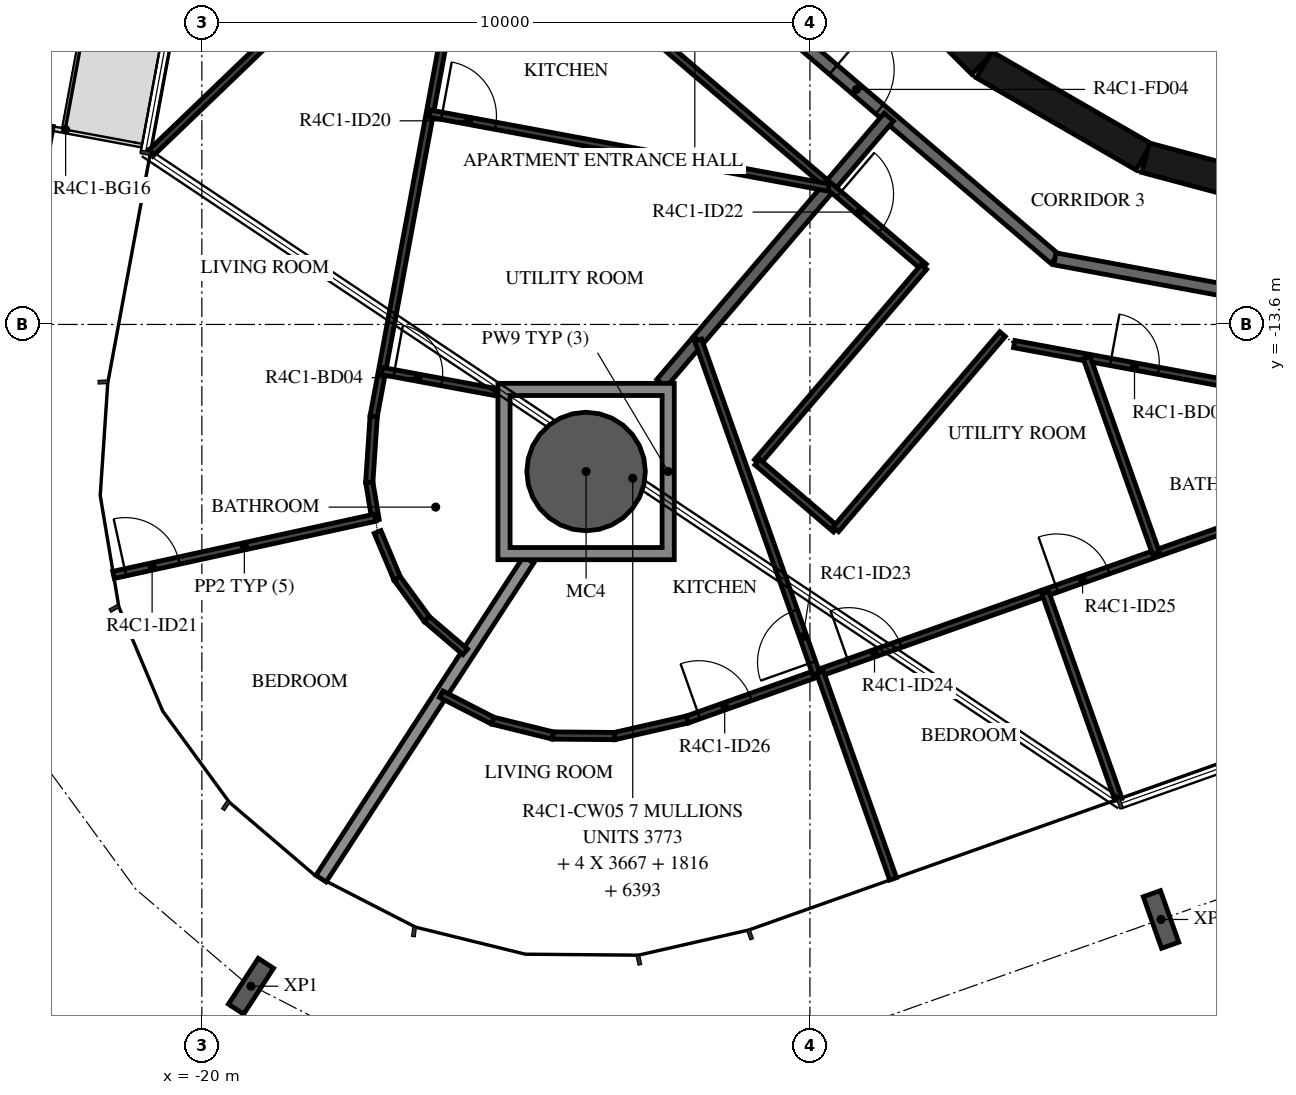
"""IFC4 building model, lengths in metres.
Left out: names, types, materials, properties, quantities, classifications, styles, units other than length and angle.
Written with IfcOpenShell. Run it as: python <this file> out.ifc"""

import sys

from ifc_helpers import new_model, si_unit, direction, frame, frame_2d, origin, origin_2d, place, context, subcontext, project, spatial, polyline, rectangle, hollow_circle, i_section, outline, extrude, element, fill, save


model = new_model("IFC4")
c1 = context("Model", 3, precision=1e-05, world=origin(), true_north=direction((0.0, 1.0)))
c2 = subcontext(c1, "Body", "Model", "MODEL_VIEW")
j1 = project(units=[si_unit("LENGTHUNIT", "METRE"), si_unit("PLANEANGLEUNIT", "RADIAN")], contexts=[c1])
p1 = place(None, origin())
s1 = spatial("IfcSite", under=j1, at=p1, CompositionType="ELEMENT")
p2 = place(p1, origin())
s2 = spatial("IfcBuilding", under=s1, at=p2, CompositionType="ELEMENT")
p3 = place(p2, frame((0.0, 0.0, 176.2)))
s3 = spatial("IfcBuildingStorey", under=s2, at=p3, CompositionType="ELEMENT", Elevation=176.2)
p4 = place(p3, frame((-13.681, -16.019, -0.38), z_axis=(0.0, 0.0, 1.0), x_axis=(1.0, 0.0, 0.0)))
e1 = element("IfcColumn", 1, at=p4, inside=s3, PredefinedType="COLUMN", context=c2, shape_type="SweptSolid", body=[
    extrude(hollow_circle(Radius=0.975, WallThickness=0.045, at=origin_2d()), origin(), (0.0, 0.0, 1.0), 3.5),
])
for number, where, z_axis, x_axis in (
    (2, (-22.914, -10.409, -0.38), (0.0, 0.0, 1.0), (0.182, 0.983, 0.0)),
    (3, (-19.192, -24.483, -0.38), (0.0, 0.0, 1.0), (-0.838, 0.546, 0.0)),
    (4, (-4.226, -23.385, -0.38), (0.0, 0.0, 1.0), (-0.943, -0.334, 0.0)),
):
    element("IfcColumn", number, at=place(p3, frame(where, z_axis=z_axis, x_axis=x_axis)), inside=s3, PredefinedType="COLUMN", context=c2, shape_type="SweptSolid", body=[
        extrude(i_section(OverallWidth=0.3, OverallDepth=0.9, WebThickness=0.019, FlangeThickness=0.035, FilletRadius=0.03, at=origin_2d()), origin(), (0.0, 0.0, 1.0), 3.5),
    ])
p5 = place(p3, frame((-9.308, -7.164, 0.0), z_axis=(0.0, 0.0, 1.0), x_axis=(0.707106781187, -0.707106781187, 0.0)))
e5 = element("IfcWall", 5, at=p5, inside=s3, PredefinedType="SHEAR", context=c2, shape_type="SweptSolid", body=[
    extrude(rectangle(XDim=3.032, YDim=0.5, at=frame_2d((1.516, 0.0))), origin(), (0.0, 0.0, 1.0), 3.12),
])
for number, where, z_axis, x_axis in (
    (6, (-7.137, -9.329, 0.0), (0.0, 0.0, 1.0), (0.866, -0.5, 0.0)),
    (7, (-4.479, -10.858, 0.0), (0.0, 0.0, 1.0), (0.966, -0.259, 0.0)),
):
    element("IfcWall", number, at=place(p3, frame(where, z_axis=z_axis, x_axis=x_axis)), inside=s3, PredefinedType="SHEAR", context=c2, shape_type="SweptSolid", body=[
        extrude(rectangle(XDim=3.033, YDim=0.5, at=frame_2d((1.516, 0.0))), origin(), (0.0, 0.0, 1.0), 3.12),
    ])
p6 = place(p3, frame((-11.433, -7.858, 0.0), z_axis=(0.0, 0.0, 1.0), x_axis=(0.760412154545, -0.649440801937, 0.0)))
e8 = element("IfcWall", 8, at=p6, inside=s3, PredefinedType="STANDARD", context=c2, shape_type="SweptSolid", body=[
    extrude(rectangle(XDim=7.181, YDim=0.2, at=frame_2d((3.59, 0.0))), origin(), (0.0, 0.0, 1.0), 3.12),
])
p7 = place(p6, frame((2.39, 0.0, 0.0)))
e9 = element("IfcOpeningElement", 9, at=p7, cuts=e8, PredefinedType="OPENING", context=c2, shape_type="SweptSolid", body=[
    extrude(rectangle(XDim=1.0, YDim=2.1, at=frame_2d((0.5, 1.05))), frame((0.0, 0.11, 0.0), z_axis=(0.0, -1.0, 0.0), x_axis=(1.0, 0.0, 0.0)), (0.0, 0.0, 1.0), 0.22),
])
p8 = place(p3, frame((-5.972, -12.521, 0.0), z_axis=(0.0, 0.0, 1.0), x_axis=(0.983256068163, -0.18222926335, 0.0)))
e10 = element("IfcWall", 10, at=p8, inside=s3, PredefinedType="STANDARD", context=c2, shape_type="SweptSolid", body=[
    extrude(rectangle(XDim=7.181, YDim=0.2, at=frame_2d((3.59, 0.0))), origin(), (0.0, 0.0, 1.0), 3.12),
])
p9 = place(p8, frame((4.7, 0.0, 0.0)))
e11 = element("IfcOpeningElement", 11, at=p9, cuts=e10, PredefinedType="OPENING", context=c2, shape_type="SweptSolid", body=[
    extrude(rectangle(XDim=1.0, YDim=2.1, at=frame_2d((0.5, 1.05))), frame((0.0, 0.11, 0.0), z_axis=(0.0, -1.0, 0.0), x_axis=(1.0, 0.0, 0.0)), (0.0, 0.0, 1.0), 0.22),
])
p10 = place(p3, frame((-11.838, -13.86, 0.0), z_axis=(0.0, 0.0, 1.0), x_axis=(0.64944503311, 0.760408540831, 0.0)))
e12 = element("IfcWall", 12, at=p10, inside=s3, PredefinedType="STANDARD", context=c2, shape_type="SweptSolid", body=[
    extrude(rectangle(XDim=4.827, YDim=0.2, at=frame_2d((2.414, 0.0))), origin(), (0.0, 0.0, 1.0), 3.12),
])
p11 = place(p3, frame((-12.443, -14.569, 0.0), z_axis=(0.0, 0.0, 1.0), x_axis=(0.649517408851, 0.760346720648, 0.0)))
e13 = element("IfcWall", 13, at=p11, inside=s3, PredefinedType="STANDARD", context=c2, shape_type="SweptSolid", body=[
    extrude(rectangle(XDim=0.932, YDim=0.2, at=frame_2d((0.466, 0.0))), origin(), (0.0, 0.0, 1.0), 3.12),
])
p12 = place(p3, frame((-18.04, -22.713, 0.0), z_axis=(0.0, 0.0, 1.0), x_axis=(0.545628572271, 0.838027124335, 0.0)))
e14 = element("IfcWall", 14, at=p12, inside=s3, PredefinedType="STANDARD", context=c2, shape_type="SweptSolid", body=[
    extrude(rectangle(XDim=6.258, YDim=0.2, at=frame_2d((3.129, 0.0))), origin(), (0.0, 0.0, 1.0), 2.73),
])
p13 = place(p3, frame((-12.713, -8.737, 0.0), z_axis=(0.0, 0.0, 1.0), x_axis=(0.760432387723, -0.649417110725, 0.0)))
e15 = element("IfcWall", 15, at=p13, inside=s3, PredefinedType="PARTITIONING", context=c2, shape_type="SweptSolid", body=[
    extrude(rectangle(XDim=6.032, YDim=0.12, at=frame_2d((3.016, 0.0))), origin(), (0.0, 0.0, 1.0), 3.12),
])
p14 = place(p13, frame((4.192, 0.0, 0.0)))
e16 = element("IfcOpeningElement", 16, at=p14, cuts=e15, PredefinedType="OPENING", context=c2, shape_type="SweptSolid", body=[
    extrude(rectangle(XDim=0.9, YDim=2.1, at=frame_2d((0.45, 1.05))), frame((0.0, 0.07, 0.0), z_axis=(0.0, -1.0, 0.0), x_axis=(1.0, 0.0, 0.0)), (0.0, 0.0, 1.0), 0.14),
])
p15 = place(p3, frame((-20.849, -10.792, 0.0), z_axis=(0.0, 0.0, 1.0), x_axis=(0.721364983662, 0.692555095531, 0.0)))
e17 = element("IfcWall", 17, at=p15, inside=s3, PredefinedType="PARTITIONING", context=c2, shape_type="SweptSolid", body=[
    extrude(rectangle(XDim=6.771, YDim=0.12, at=frame_2d((3.385, 0.0))), origin(), (0.0, 0.0, 1.0), 3.12),
])
p16 = place(p3, frame((-15.51, -6.13, 0.0), z_axis=(0.0, 0.0, 1.0), x_axis=(-0.182243361628, -0.98325345519, 0.0)))
e18 = element("IfcWall", 18, at=p16, inside=s3, PredefinedType="PARTITIONING", context=c2, shape_type="SweptSolid", body=[
    extrude(rectangle(XDim=9.134, YDim=0.12, at=frame_2d((4.567, 0.0))), origin(), (0.0, 0.0, 1.0), 3.12),
])
p17 = place(p16, frame((0.6, 0.0, 0.0)))
e19 = element("IfcOpeningElement", 19, at=p17, cuts=e18, PredefinedType="OPENING", context=c2, shape_type="SweptSolid", body=[
    extrude(rectangle(XDim=0.9, YDim=2.1, at=frame_2d((0.45, 1.05))), frame((0.0, 0.07, 0.0), z_axis=(0.0, -1.0, 0.0), x_axis=(1.0, 0.0, 0.0)), (0.0, 0.0, 1.0), 0.14),
])
p18 = place(p3, frame((-16.252, -10.133, 0.0), z_axis=(0.0, 0.0, 1.0), x_axis=(0.983256998026, -0.182224246005, 0.0)))
e20 = element("IfcWall", 20, at=p18, inside=s3, PredefinedType="PARTITIONING", context=c2, shape_type="SweptSolid", body=[
    extrude(rectangle(XDim=6.671, YDim=0.12, at=frame_2d((3.335, 0.0))), origin(), (0.0, 0.0, 1.0), 3.12),
])
p19 = place(p18, frame((0.2, 0.0, 0.0)))
e21 = element("IfcOpeningElement", 21, at=p19, cuts=e20, PredefinedType="OPENING", context=c2, shape_type="SweptSolid", body=[
    extrude(rectangle(XDim=0.9, YDim=2.1, at=frame_2d((0.45, 1.05))), frame((0.0, 0.07, 0.0), z_axis=(0.0, -1.0, 0.0), x_axis=(1.0, 0.0, 0.0)), (0.0, 0.0, 1.0), 0.14),
])
p20 = place(p3, frame((-17.143, -16.817, 0.0), z_axis=(0.0, 0.0, 1.0), x_axis=(-0.164964120994, 0.98629956848, 0.0)))
e22 = element("IfcWall", 22, at=p20, inside=s3, PredefinedType="PARTITIONING", context=c2, shape_type="SweptSolid", body=[
    extrude(rectangle(XDim=0.63, YDim=0.12, at=frame_2d((0.315, 0.0))), origin(), (0.0, 0.0, 1.0), 3.12),
])
p21 = place(p3, frame((-17.247, -16.195, 0.0), z_axis=(0.0, 0.0, 1.0), x_axis=(0.066712820538, 0.997772218282, 0.0)))
e23 = element("IfcWall", 23, at=p21, inside=s3, PredefinedType="PARTITIONING", context=c2, shape_type="SweptSolid", body=[
    extrude(rectangle(XDim=1.087, YDim=0.12, at=frame_2d((0.543, 0.0))), origin(), (0.0, 0.0, 1.0), 3.12),
])
p22 = place(p3, frame((-21.453, -17.719, 0.0), z_axis=(0.0, 0.0, 1.0), x_axis=(0.976887361549, 0.213754725903, 0.0)))
e24 = element("IfcWall", 24, at=p22, inside=s3, PredefinedType="PARTITIONING", context=c2, shape_type="SweptSolid", body=[
    extrude(rectangle(XDim=4.405, YDim=0.12, at=frame_2d((2.203, 0.0))), origin(), (0.0, 0.0, 1.0), 2.73),
])
p23 = place(p22, frame((0.2, 0.0, 0.0)))
e25 = element("IfcOpeningElement", 25, at=p23, cuts=e24, PredefinedType="OPENING", context=c2, shape_type="SweptSolid", body=[
    extrude(rectangle(XDim=0.9, YDim=2.1, at=frame_2d((0.45, 1.05))), frame((0.0, 0.07, 0.0), z_axis=(0.0, -1.0, 0.0), x_axis=(1.0, 0.0, 0.0)), (0.0, 0.0, 1.0), 0.14),
])
p24 = place(p3, frame((-17.036, -14.366, 0.0), z_axis=(0.0, 0.0, 1.0), x_axis=(0.983259435886, -0.182211091156, 0.0)))
e26 = element("IfcWall", 26, at=p24, inside=s3, PredefinedType="PARTITIONING", context=c2, shape_type="SweptSolid", body=[
    extrude(rectangle(XDim=1.938, YDim=0.12, at=frame_2d((0.969, 0.0))), origin(), (0.0, 0.0, 1.0), 3.12),
])
p25 = place(p24, frame((0.2, 0.0, 0.0)))
e27 = element("IfcOpeningElement", 27, at=p25, cuts=e26, PredefinedType="OPENING", context=c2, shape_type="SweptSolid", body=[
    extrude(rectangle(XDim=0.8, YDim=2.1, at=frame_2d((0.4, 1.05))), frame((0.0, 0.07, 0.0), z_axis=(0.0, -1.0, 0.0), x_axis=(1.0, 0.0, 0.0)), (0.0, 0.0, 1.0), 0.14),
])
for number, where, z_axis, x_axis in (
    (28, (-17.11, -17.013, 0.0), (0.0, 0.0, 1.0), (0.388, -0.922, 0.0)),
    (29, (-16.788, -17.777, 0.0), (0.0, 0.0, 1.0), (0.59, -0.807, 0.0)),
    (30, (-16.299, -18.446, 0.0), (0.0, 0.0, 1.0), (0.76, -0.649, 0.0)),
):
    element("IfcWall", number, at=place(p3, frame(where, z_axis=z_axis, x_axis=x_axis)), inside=s3, PredefinedType="PARTITIONING", context=c2, shape_type="SweptSolid", body=[
        extrude(rectangle(XDim=0.829, YDim=0.12, at=frame_2d((0.415, 0.0))), origin(), (0.0, 0.0, 1.0), 3.12),
    ])
p26 = place(p3, frame((-8.125, -12.655, 0.0), z_axis=(0.0, 0.0, 1.0), x_axis=(-0.649441944702, -0.760411178549, 0.0)))
e31 = element("IfcWall", 31, at=p26, inside=s3, PredefinedType="PARTITIONING", context=c2, shape_type="SweptSolid", body=[
    extrude(rectangle(XDim=4.22, YDim=0.12, at=frame_2d((2.11, 0.0))), origin(), (0.0, 0.0, 1.0), 3.12),
])
p27 = place(p3, frame((-10.866, -15.864, 0.0), z_axis=(0.0, 0.0, 1.0), x_axis=(0.760431300628, -0.649418383652, 0.0)))
e32 = element("IfcWall", 32, at=p27, inside=s3, PredefinedType="PARTITIONING", context=c2, shape_type="SweptSolid", body=[
    extrude(rectangle(XDim=1.7, YDim=0.12, at=frame_2d((0.85, 0.0))), origin(), (0.0, 0.0, 1.0), 3.12),
])
p28 = place(p3, frame((-9.573, -16.968, 0.0), z_axis=(0.0, 0.0, 1.0), x_axis=(0.649437062208, 0.760415348498, 0.0)))
e33 = element("IfcWall", 33, at=p28, inside=s3, PredefinedType="PARTITIONING", context=c2, shape_type="SweptSolid", body=[
    extrude(rectangle(XDim=4.219, YDim=0.12, at=frame_2d((2.11, 0.0))), origin(), (0.0, 0.0, 1.0), 3.12),
])
p29 = place(p3, frame((-6.641, -13.923, 0.0), z_axis=(0.0, 0.0, 1.0), x_axis=(0.983250157272, -0.182261153912, 0.0)))
e34 = element("IfcWall", 34, at=p29, inside=s3, PredefinedType="PARTITIONING", context=c2, shape_type="SweptSolid", body=[
    extrude(rectangle(XDim=7.985, YDim=0.12, at=frame_2d((3.992, 0.0))), origin(), (0.0, 0.0, 1.0), 3.12),
])
p30 = place(p29, frame((1.612, 0.0, 0.0)))
e35 = element("IfcOpeningElement", 35, at=p30, cuts=e34, PredefinedType="OPENING", context=c2, shape_type="SweptSolid", body=[
    extrude(rectangle(XDim=0.8, YDim=2.1, at=frame_2d((0.4, 1.05))), frame((0.0, 0.07, 0.0), z_axis=(0.0, -1.0, 0.0), x_axis=(1.0, 0.0, 0.0)), (0.0, 0.0, 1.0), 0.14),
])
p31 = place(p3, frame((-16.065, -19.68, 0.0), z_axis=(0.0, 0.0, 1.0), x_axis=(0.889684645268, -0.456575549033, 0.0)))
e36 = element("IfcWall", 36, at=p31, inside=s3, PredefinedType="PARTITIONING", context=c2, shape_type="SweptSolid", body=[
    extrude(rectangle(XDim=0.957, YDim=0.12, at=frame_2d((0.479, 0.0))), origin(), (0.0, 0.0, 1.0), 3.12),
])
p32 = place(p3, frame((-15.214, -20.117, 0.0), z_axis=(0.0, 0.0, 1.0), x_axis=(0.970998575146, -0.239085271534, 0.0)))
e37 = element("IfcWall", 37, at=p32, inside=s3, PredefinedType="PARTITIONING", context=c2, shape_type="SweptSolid", body=[
    extrude(rectangle(XDim=1.016, YDim=0.12, at=frame_2d((0.508, 0.0))), origin(), (0.0, 0.0, 1.0), 3.12),
])
p33 = place(p3, frame((-14.227, -20.36, 0.0), z_axis=(0.0, 0.0, 1.0), x_axis=(0.999960467683, -0.008891741722, 0.0)))
e38 = element("IfcWall", 38, at=p33, inside=s3, PredefinedType="PARTITIONING", context=c2, shape_type="SweptSolid", body=[
    extrude(rectangle(XDim=1.016, YDim=0.12, at=frame_2d((0.508, 0.0))), origin(), (0.0, 0.0, 1.0), 3.12),
])
p34 = place(p3, frame((-13.211, -20.369, 0.0), z_axis=(0.0, 0.0, 1.0), x_axis=(0.974997834831, 0.222214360642, 0.0)))
e39 = element("IfcWall", 39, at=p34, inside=s3, PredefinedType="PARTITIONING", context=c2, shape_type="SweptSolid", body=[
    extrude(rectangle(XDim=1.227, YDim=0.12, at=frame_2d((0.614, 0.0))), origin(), (0.0, 0.0, 1.0), 3.12),
])
p35 = place(p3, frame((-12.015, -20.096, 0.0), z_axis=(0.0, 0.0, 1.0), x_axis=(0.942638913957, 0.33381413675, 0.0)))
e40 = element("IfcWall", 40, at=p35, inside=s3, PredefinedType="PARTITIONING", context=c2, shape_type="SweptSolid", body=[
    extrude(rectangle(XDim=14.104, YDim=0.12, at=frame_2d((7.052, 0.0))), origin(), (0.0, 0.0, 1.0), 3.12),
])
p36 = place(p35, frame((2.814, 0.0, 0.0)))
e41 = element("IfcOpeningElement", 41, at=p36, cuts=e40, PredefinedType="OPENING", context=c2, shape_type="SweptSolid", body=[
    extrude(rectangle(XDim=0.9, YDim=2.1, at=frame_2d((0.45, 1.05))), frame((0.0, 0.07, 0.0), z_axis=(0.0, -1.0, 0.0), x_axis=(1.0, 0.0, 0.0)), (0.0, 0.0, 1.0), 0.14),
])
p37 = place(p35, frame((6.444, 0.0, 0.0)))
e42 = element("IfcOpeningElement", 42, at=p37, cuts=e40, PredefinedType="OPENING", context=c2, shape_type="SweptSolid", body=[
    extrude(rectangle(XDim=0.9, YDim=2.1, at=frame_2d((0.45, 1.05))), frame((0.0, 0.07, 0.0), z_axis=(0.0, -1.0, 0.0), x_axis=(1.0, 0.0, 0.0)), (0.0, 0.0, 1.0), 0.14),
])
p38 = place(p35, frame((0.2, 0.0, 0.0)))
e43 = element("IfcOpeningElement", 43, at=p38, cuts=e40, PredefinedType="OPENING", context=c2, shape_type="SweptSolid", body=[
    extrude(rectangle(XDim=0.9, YDim=2.1, at=frame_2d((0.45, 1.05))), frame((0.0, 0.07, 0.0), z_axis=(0.0, -1.0, 0.0), x_axis=(1.0, 0.0, 0.0)), (0.0, 0.0, 1.0), 0.14),
])
p39 = place(p3, frame((-9.895, -19.346, 0.0), z_axis=(0.0, 0.0, 1.0), x_axis=(-0.333781129158, 0.942650602195, 0.0)))
e44 = element("IfcWall", 44, at=p39, inside=s3, PredefinedType="PARTITIONING", context=c2, shape_type="SweptSolid", body=[
    extrude(rectangle(XDim=5.819, YDim=0.12, at=frame_2d((2.91, 0.0))), origin(), (0.0, 0.0, 1.0), 3.12),
])
p40 = place(p39, frame((0.2, 0.0, 0.0)))
e45 = element("IfcOpeningElement", 45, at=p40, cuts=e44, PredefinedType="OPENING", context=c2, shape_type="SweptSolid", body=[
    extrude(rectangle(XDim=0.9, YDim=2.1, at=frame_2d((0.45, 1.05))), frame((0.0, 0.07, 0.0), z_axis=(0.0, -1.0, 0.0), x_axis=(1.0, 0.0, 0.0)), (0.0, 0.0, 1.0), 0.14),
])
p41 = place(p3, frame((-8.632, -22.718, 0.0), z_axis=(0.0, 0.0, 1.0), x_axis=(-0.333791905243, 0.942646786445, 0.0)))
e46 = element("IfcWall", 46, at=p41, inside=s3, PredefinedType="PARTITIONING", context=c2, shape_type="SweptSolid", body=[
    extrude(rectangle(XDim=3.6, YDim=0.12, at=frame_2d((1.8, 0.0))), origin(), (0.0, 0.0, 1.0), 3.12),
])
p42 = place(p3, frame((-4.308, -17.367, 0.0), z_axis=(0.0, 0.0, 1.0), x_axis=(-0.333802202677, 0.942643140052, 0.0)))
e47 = element("IfcWall", 47, at=p42, inside=s3, PredefinedType="PARTITIONING", context=c2, shape_type="SweptSolid", body=[
    extrude(rectangle(XDim=3.419, YDim=0.12, at=frame_2d((1.709, 0.0))), origin(), (0.0, 0.0, 1.0), 3.12),
])
p43 = place(p3, frame((-4.927, -21.406, 0.0), z_axis=(0.0, 0.0, 1.0), x_axis=(-0.333813244781, 0.942639229827, 0.0)))
e48 = element("IfcWall", 48, at=p43, inside=s3, PredefinedType="PARTITIONING", context=c2, shape_type="SweptSolid", body=[
    extrude(rectangle(XDim=3.6, YDim=0.12, at=frame_2d((1.8, 0.0))), origin(), (0.0, 0.0, 1.0), 2.73),
])
p44 = place(p3, origin())
e49 = element("IfcWall", 49, at=p44, inside=s3, PredefinedType="STANDARD", context=c2, shape_type="SweptSolid", body=[
    extrude(outline(polyline([(-12.231, -14.569), (-12.231, -17.469), (-15.131, -17.469), (-15.131, -14.569), (-12.231, -14.569)]), holes=[polyline([(-14.931, -17.269), (-12.431, -17.269), (-12.431, -14.769), (-14.931, -14.769), (-14.931, -17.269)])]), origin(), (0.0, 0.0, 1.0), 3.12),
])
p45 = place(p7, origin())
e50 = element("IfcDoor", 50, at=p45, inside=s3, OperationType="SINGLE_SWING_RIGHT", PredefinedType="DOOR", context=c2, shape_type="SweptSolid", body=[
    extrude(rectangle(XDim=1.0, YDim=2.1, at=frame_2d((0.5, 1.05))), frame((0.0, 0.025, 0.0), z_axis=(0.0, -1.0, 0.0), x_axis=(1.0, 0.0, 0.0)), (0.0, 0.0, 1.0), 0.05),
])
fill(e9, e50)
p46 = place(p19, origin())
e51 = element("IfcDoor", 51, at=p46, inside=s3, OperationType="SINGLE_SWING_RIGHT", PredefinedType="DOOR", context=c2, shape_type="SweptSolid", body=[
    extrude(rectangle(XDim=0.9, YDim=2.1, at=frame_2d((0.45, 1.05))), frame((0.0, 0.025, 0.0), z_axis=(0.0, -1.0, 0.0), x_axis=(1.0, 0.0, 0.0)), (0.0, 0.0, 1.0), 0.05),
])
fill(e21, e51)
p47 = place(p25, origin())
e52 = element("IfcDoor", 52, at=p47, inside=s3, OperationType="SINGLE_SWING_RIGHT", PredefinedType="DOOR", context=c2, shape_type="SweptSolid", body=[
    extrude(rectangle(XDim=0.8, YDim=2.1, at=frame_2d((0.4, 1.05))), frame((0.0, 0.025, 0.0), z_axis=(0.0, -1.0, 0.0), x_axis=(1.0, 0.0, 0.0)), (0.0, 0.0, 1.0), 0.05),
])
fill(e27, e52)
p48 = place(p23, origin())
e53 = element("IfcDoor", 53, at=p48, inside=s3, OperationType="SINGLE_SWING_RIGHT", PredefinedType="DOOR", context=c2, shape_type="SweptSolid", body=[
    extrude(rectangle(XDim=0.9, YDim=2.1, at=frame_2d((0.45, 1.05))), frame((0.0, 0.025, 0.0), z_axis=(0.0, -1.0, 0.0), x_axis=(1.0, 0.0, 0.0)), (0.0, 0.0, 1.0), 0.05),
])
fill(e25, e53)
p49 = place(p14, origin())
e54 = element("IfcDoor", 54, at=p49, inside=s3, OperationType="SINGLE_SWING_LEFT", PredefinedType="DOOR", context=c2, shape_type="SweptSolid", body=[
    extrude(rectangle(XDim=0.9, YDim=2.1, at=frame_2d((0.45, 1.05))), frame((0.0, 0.025, 0.0), z_axis=(0.0, -1.0, 0.0), x_axis=(1.0, 0.0, 0.0)), (0.0, 0.0, 1.0), 0.05),
])
fill(e16, e54)
p50 = place(p30, origin())
e55 = element("IfcDoor", 55, at=p50, inside=s3, OperationType="SINGLE_SWING_LEFT", PredefinedType="DOOR", context=c2, shape_type="SweptSolid", body=[
    extrude(rectangle(XDim=0.8, YDim=2.1, at=frame_2d((0.4, 1.05))), frame((0.0, 0.025, 0.0), z_axis=(0.0, -1.0, 0.0), x_axis=(1.0, 0.0, 0.0)), (0.0, 0.0, 1.0), 0.05),
])
fill(e35, e55)
p51 = place(p40, origin())
e56 = element("IfcDoor", 56, at=p51, inside=s3, OperationType="SINGLE_SWING_LEFT", PredefinedType="DOOR", context=c2, shape_type="SweptSolid", body=[
    extrude(rectangle(XDim=0.9, YDim=2.1, at=frame_2d((0.45, 1.05))), frame((0.0, 0.025, 0.0), z_axis=(0.0, -1.0, 0.0), x_axis=(1.0, 0.0, 0.0)), (0.0, 0.0, 1.0), 0.05),
])
fill(e45, e56)
p52 = place(p36, origin())
e57 = element("IfcDoor", 57, at=p52, inside=s3, OperationType="SINGLE_SWING_LEFT", PredefinedType="DOOR", context=c2, shape_type="SweptSolid", body=[
    extrude(rectangle(XDim=0.9, YDim=2.1, at=frame_2d((0.45, 1.05))), frame((0.0, 0.025, 0.0), z_axis=(0.0, -1.0, 0.0), x_axis=(1.0, 0.0, 0.0)), (0.0, 0.0, 1.0), 0.05),
])
fill(e41, e57)
p53 = place(p37, origin())
e58 = element("IfcDoor", 58, at=p53, inside=s3, OperationType="SINGLE_SWING_LEFT", PredefinedType="DOOR", context=c2, shape_type="SweptSolid", body=[
    extrude(rectangle(XDim=0.9, YDim=2.1, at=frame_2d((0.45, 1.05))), frame((0.0, 0.025, 0.0), z_axis=(0.0, -1.0, 0.0), x_axis=(1.0, 0.0, 0.0)), (0.0, 0.0, 1.0), 0.05),
])
fill(e42, e58)
p54 = place(p38, origin())
e59 = element("IfcDoor", 59, at=p54, inside=s3, OperationType="SINGLE_SWING_RIGHT", PredefinedType="DOOR", context=c2, shape_type="SweptSolid", body=[
    extrude(rectangle(XDim=0.9, YDim=2.1, at=frame_2d((0.45, 1.05))), frame((0.0, 0.025, 0.0), z_axis=(0.0, -1.0, 0.0), x_axis=(1.0, 0.0, 0.0)), (0.0, 0.0, 1.0), 0.05),
])
fill(e43, e59)
save(model, sys.argv[1])
